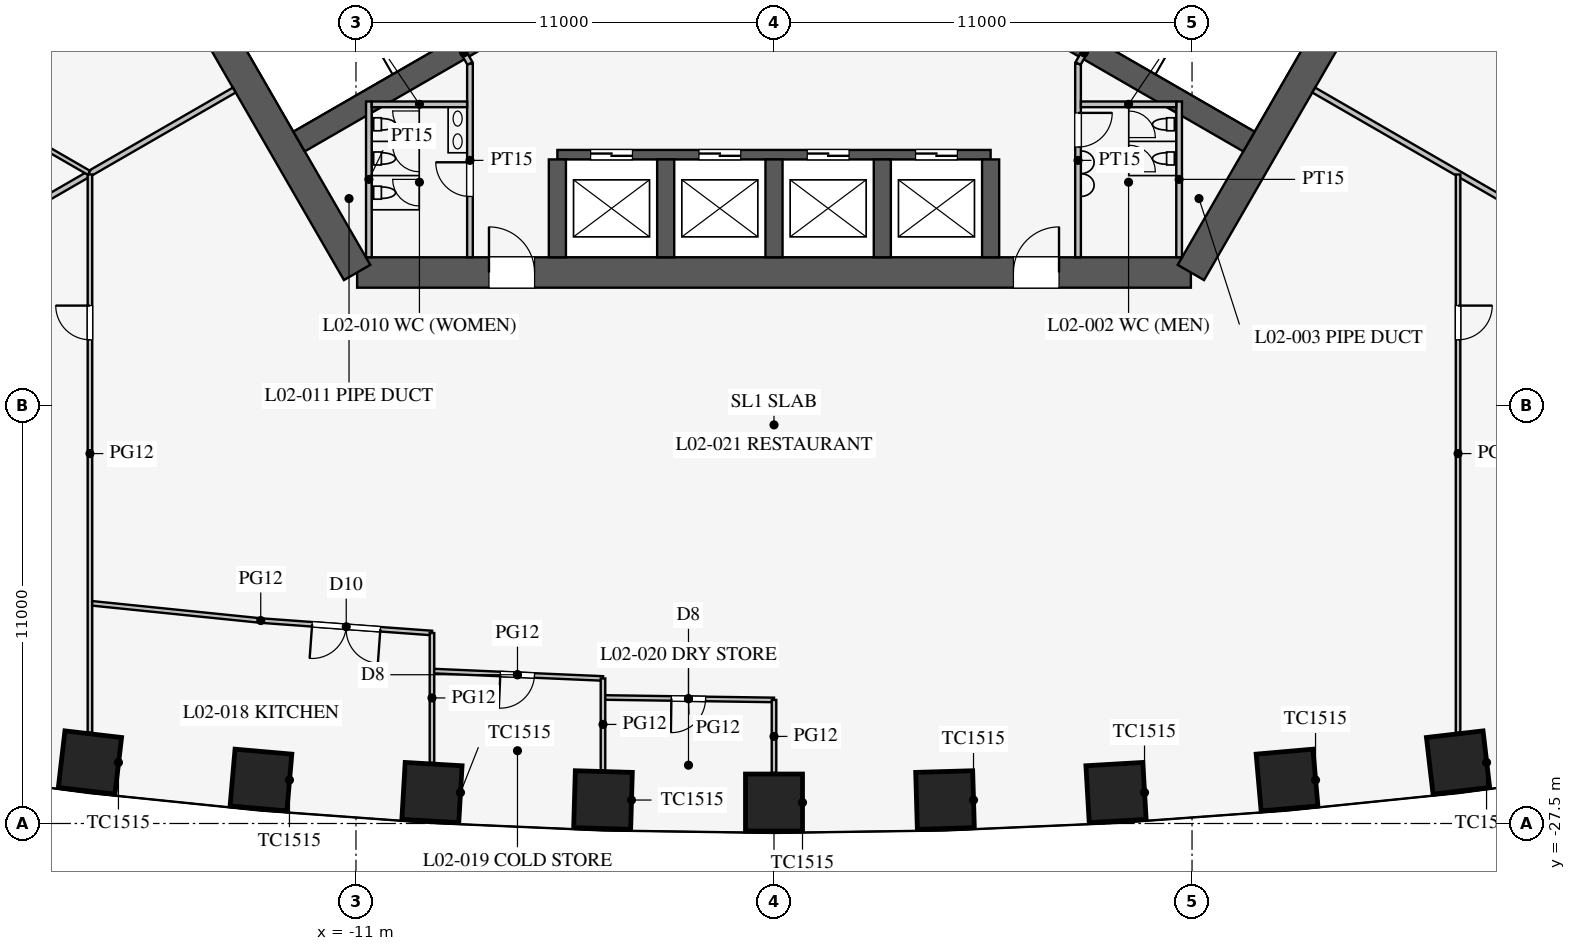
"""IFC4 building model, lengths in metres.
Left out: names, types, materials, properties, quantities, classifications, styles, units other than length and angle.
Written with IfcOpenShell. Run it as: python <this file> out.ifc"""

import sys

from ifc_helpers import new_model, si_unit, direction, frame, frame_2d, origin, origin_2d, place, context, subcontext, project, spatial, rectangle, extrude, element, fill, save


model = new_model("IFC4")
c1 = context("Model", 3, precision=1e-05, world=origin(), true_north=direction((0.0, 1.0)))
c2 = subcontext(c1, "Body", "Model", "MODEL_VIEW")
j1 = project(units=[si_unit("LENGTHUNIT", "METRE"), si_unit("PLANEANGLEUNIT", "RADIAN")], contexts=[c1])
p1 = place(None, origin())
s1 = spatial("IfcSite", under=j1, at=p1, CompositionType="ELEMENT")
p2 = place(p1, origin())
s2 = spatial("IfcBuilding", under=s1, at=p2, CompositionType="ELEMENT")
p3 = place(p2, frame((0.0, 0.0, 11.5)))
s3 = spatial("IfcBuildingStorey", under=s2, at=p3, CompositionType="ELEMENT", Elevation=11.5)
for number, where, z_axis, x_axis in (
    (1, (-18.0, -25.895, 0.0), (0.0, 0.0, 1.0), (0.993, -0.116, 0.0)),
    (2, (-13.5, -26.357, 0.0), (0.0, 0.0, 1.0), (0.996, -0.087, 0.0)),
    (3, (-9.0, -26.686, 0.0), (0.0, 0.0, 1.0), (0.998, -0.058, 0.0)),
    (4, (-4.5, -26.883, 0.0), (0.0, 0.0, 1.0), (1.0, -0.029, 0.0)),
    (5, (0.0, -26.949, 0.0), (0.0, 0.0, 1.0), (1.0, 0.0, 0.0)),
    (6, (4.5, -26.883, 0.0), (0.0, 0.0, 1.0), (1.0, 0.029, 0.0)),
    (7, (9.0, -26.686, 0.0), (0.0, 0.0, 1.0), (0.998, 0.058, 0.0)),
    (8, (13.5, -26.357, 0.0), (0.0, 0.0, 1.0), (0.996, 0.087, 0.0)),
    (9, (18.0, -25.895, 0.0), (0.0, 0.0, 1.0), (0.993, 0.116, 0.0)),
):
    element("IfcColumn", number, at=place(p3, frame(where, z_axis=z_axis, x_axis=x_axis)), inside=s3, PredefinedType="COLUMN", context=c2, shape_type="SweptSolid", body=[
        extrude(rectangle(XDim=1.5, YDim=1.5, at=origin_2d()), origin(), (0.0, 0.0, 1.0), 5.0),
    ])
p4 = place(p3, frame((-10.97, -13.0, 0.0), z_axis=(0.0, 0.0, 1.0), x_axis=(1.0, 0.0, 0.0)))
e10 = element("IfcWall", 10, at=p4, inside=s3, PredefinedType="SHEAR", context=c2, shape_type="SweptSolid", body=[
    extrude(rectangle(XDim=21.939, YDim=0.8, at=frame_2d((10.97, 0.0))), origin(), (0.0, 0.0, 1.0), 5.0),
])
p5 = place(p4, frame((17.27, 0.0, 0.0)))
e11 = element("IfcOpeningElement", 11, at=p5, cuts=e10, PredefinedType="OPENING", context=c2, shape_type="SweptSolid", body=[
    extrude(rectangle(XDim=1.2, YDim=2.1, at=frame_2d((0.6, 1.05))), frame((0.0, 0.41, 0.0), z_axis=(0.0, -1.0, 0.0), x_axis=(1.0, 0.0, 0.0)), (0.0, 0.0, 1.0), 0.82),
])
p6 = place(p4, frame((3.47, 0.0, 0.0)))
e12 = element("IfcOpeningElement", 12, at=p6, cuts=e10, PredefinedType="OPENING", context=c2, shape_type="SweptSolid", body=[
    extrude(rectangle(XDim=1.2, YDim=2.1, at=frame_2d((0.6, 1.05))), frame((0.0, 0.41, 0.0), z_axis=(0.0, -1.0, 0.0), x_axis=(1.0, 0.0, 0.0)), (0.0, 0.0, 1.0), 0.82),
])
for number, where, z_axis, x_axis in (
    (13, (10.97, -13.0, 0.0), (0.0, 0.0, 1.0), (0.5, 0.866, 0.0)),
    (14, (-16.743, -3.0, 0.0), (0.0, 0.0, 1.0), (0.5, -0.866, 0.0)),
):
    element("IfcWall", number, at=place(p3, frame(where, z_axis=z_axis, x_axis=x_axis)), inside=s3, PredefinedType="SHEAR", context=c2, shape_type="SweptSolid", body=[
        extrude(rectangle(XDim=11.547, YDim=0.8, at=frame_2d((5.773, 0.0))), origin(), (0.0, 0.0, 1.0), 5.0),
    ])
p7 = place(p3, frame((-5.7, -9.9, 0.0), z_axis=(0.0, 0.0, 1.0), x_axis=(1.0, 0.0, 0.0)))
e15 = element("IfcWall", 15, at=p7, inside=s3, PredefinedType="SHEAR", context=c2, shape_type="SweptSolid", body=[
    extrude(rectangle(XDim=11.4, YDim=0.25, at=frame_2d((5.7, 0.0))), origin(), (0.0, 0.0, 1.0), 5.0),
])
p8 = place(p7, frame((0.875, 0.0, 0.0)))
e16 = element("IfcOpeningElement", 16, at=p8, cuts=e15, PredefinedType="OPENING", context=c2, shape_type="SweptSolid", body=[
    extrude(rectangle(XDim=1.1, YDim=2.2, at=frame_2d((0.55, 1.1))), frame((0.0, 0.135, 0.0), z_axis=(0.0, -1.0, 0.0), x_axis=(1.0, 0.0, 0.0)), (0.0, 0.0, 1.0), 0.27),
])
p9 = place(p7, frame((3.725, 0.0, 0.0)))
e17 = element("IfcOpeningElement", 17, at=p9, cuts=e15, PredefinedType="OPENING", context=c2, shape_type="SweptSolid", body=[
    extrude(rectangle(XDim=1.1, YDim=2.2, at=frame_2d((0.55, 1.1))), frame((0.0, 0.135, 0.0), z_axis=(0.0, -1.0, 0.0), x_axis=(1.0, 0.0, 0.0)), (0.0, 0.0, 1.0), 0.27),
])
p10 = place(p7, frame((6.575, 0.0, 0.0)))
e18 = element("IfcOpeningElement", 18, at=p10, cuts=e15, PredefinedType="OPENING", context=c2, shape_type="SweptSolid", body=[
    extrude(rectangle(XDim=1.1, YDim=2.2, at=frame_2d((0.55, 1.1))), frame((0.0, 0.135, 0.0), z_axis=(0.0, -1.0, 0.0), x_axis=(1.0, 0.0, 0.0)), (0.0, 0.0, 1.0), 0.27),
])
p11 = place(p7, frame((9.425, 0.0, 0.0)))
e19 = element("IfcOpeningElement", 19, at=p11, cuts=e15, PredefinedType="OPENING", context=c2, shape_type="SweptSolid", body=[
    extrude(rectangle(XDim=1.1, YDim=2.2, at=frame_2d((0.55, 1.1))), frame((0.0, 0.135, 0.0), z_axis=(0.0, -1.0, 0.0), x_axis=(1.0, 0.0, 0.0)), (0.0, 0.0, 1.0), 0.27),
])
for number, where, z_axis, x_axis in (
    (20, (-5.7, -10.025, 0.0), (0.0, 0.0, 1.0), (0.0, -1.0, 0.0)),
    (21, (-2.85, -10.025, 0.0), (0.0, 0.0, 1.0), (0.0, -1.0, 0.0)),
    (22, (0.0, -10.025, 0.0), (0.0, 0.0, 1.0), (0.0, -1.0, 0.0)),
    (23, (2.85, -10.025, 0.0), (0.0, 0.0, 1.0), (0.0, -1.0, 0.0)),
    (24, (5.7, -10.025, 0.0), (0.0, 0.0, 1.0), (0.0, -1.0, 0.0)),
):
    element("IfcWall", number, at=place(p3, frame(where, z_axis=z_axis, x_axis=x_axis)), inside=s3, PredefinedType="SHEAR", context=c2, shape_type="SweptSolid", body=[
        extrude(rectangle(XDim=2.575, YDim=0.45, at=frame_2d((1.288, 0.0))), origin(), (0.0, 0.0, 1.0), 5.0),
    ])
for number, where, z_axis, x_axis in (
    (25, (4.638, -5.016, 0.0), (0.0, 0.0, 1.0), (0.866, -0.5, 0.0)),
    (26, (-4.638, -5.016, 0.0), (0.0, 0.0, 1.0), (-0.866, -0.5, 0.0)),
):
    element("IfcWall", number, at=place(p3, frame(where, z_axis=z_axis, x_axis=x_axis)), inside=s3, PredefinedType="SHEAR", context=c2, shape_type="SweptSolid", body=[
        extrude(rectangle(XDim=9.075, YDim=0.6, at=frame_2d((4.538, 0.0))), origin(), (0.0, 0.0, 1.0), 5.0),
    ])
p12 = place(p3, frame((8.0, -7.5, 0.0), z_axis=(0.0, 0.0, 1.0), x_axis=(0.0, -1.0, 0.0)))
e27 = element("IfcWall", 27, at=p12, inside=s3, PredefinedType="PARTITIONING", context=c2, shape_type="SweptSolid", body=[
    extrude(rectangle(XDim=5.1, YDim=0.15, at=frame_2d((2.55, 0.0))), origin(), (0.0, 0.0, 1.0), 4.8),
])
p13 = place(p12, frame((1.3, 0.0, 0.0)))
e28 = element("IfcOpeningElement", 28, at=p13, cuts=e27, PredefinedType="OPENING", context=c2, shape_type="SweptSolid", body=[
    extrude(rectangle(XDim=0.9, YDim=2.1, at=frame_2d((0.45, 1.05))), frame((0.0, 0.085, 0.0), z_axis=(0.0, -1.0, 0.0), x_axis=(1.0, 0.0, 0.0)), (0.0, 0.0, 1.0), 0.17),
])
p14 = place(p3, frame((-8.0, -7.5, 0.0), z_axis=(0.0, 0.0, 1.0), x_axis=(0.0, -1.0, 0.0)))
e29 = element("IfcWall", 29, at=p14, inside=s3, PredefinedType="PARTITIONING", context=c2, shape_type="SweptSolid", body=[
    extrude(rectangle(XDim=5.1, YDim=0.15, at=frame_2d((2.55, 0.0))), origin(), (0.0, 0.0, 1.0), 4.8),
])
p15 = place(p14, frame((2.6, 0.0, 0.0)))
e30 = element("IfcOpeningElement", 30, at=p15, cuts=e29, PredefinedType="OPENING", context=c2, shape_type="SweptSolid", body=[
    extrude(rectangle(XDim=0.9, YDim=2.1, at=frame_2d((0.45, 1.05))), frame((0.0, 0.085, 0.0), z_axis=(0.0, -1.0, 0.0), x_axis=(1.0, 0.0, 0.0)), (0.0, 0.0, 1.0), 0.17),
])
for number, where, z_axis, x_axis in (
    (31, (8.0, -7.5, 0.0), (0.0, 0.0, 1.0), (0.5, 0.866, 0.0)),
    (32, (-8.0, -7.5, 0.0), (0.0, 0.0, 1.0), (-0.5, 0.866, 0.0)),
):
    element("IfcWall", number, at=place(p3, frame(where, z_axis=z_axis, x_axis=x_axis)), inside=s3, PredefinedType="PARTITIONING", context=c2, shape_type="SweptSolid", body=[
        extrude(rectangle(XDim=0.645, YDim=0.15, at=frame_2d((0.323, 0.0))), origin(), (0.0, 0.0, 1.0), 4.8),
    ])
p16 = place(p3, frame((10.66, -8.5, 0.0), z_axis=(0.0, 0.0, 1.0), x_axis=(0.0, -1.0, 0.0)))
e33 = element("IfcWall", 33, at=p16, inside=s3, PredefinedType="PARTITIONING", context=c2, shape_type="SweptSolid", body=[
    extrude(rectangle(XDim=4.1, YDim=0.15, at=frame_2d((2.05, 0.0))), origin(), (0.0, 0.0, 1.0), 4.8),
])
p17 = place(p3, frame((8.075, -8.575, 0.0), z_axis=(0.0, 0.0, 1.0), x_axis=(1.0, 0.0, 0.0)))
e34 = element("IfcWall", 34, at=p17, inside=s3, PredefinedType="PARTITIONING", context=c2, shape_type="SweptSolid", body=[
    extrude(rectangle(XDim=2.51, YDim=0.15, at=frame_2d((1.255, 0.0))), origin(), (0.0, 0.0, 1.0), 4.8),
])
p18 = place(p3, frame((-10.66, -8.5, 0.0), z_axis=(0.0, 0.0, 1.0), x_axis=(0.0, -1.0, 0.0)))
e35 = element("IfcWall", 35, at=p18, inside=s3, PredefinedType="PARTITIONING", context=c2, shape_type="SweptSolid", body=[
    extrude(rectangle(XDim=4.1, YDim=0.15, at=frame_2d((2.05, 0.0))), origin(), (0.0, 0.0, 1.0), 4.8),
])
p19 = place(p3, frame((-8.075, -8.575, 0.0), z_axis=(0.0, 0.0, 1.0), x_axis=(-1.0, 0.0, 0.0)))
e36 = element("IfcWall", 36, at=p19, inside=s3, PredefinedType="PARTITIONING", context=c2, shape_type="SweptSolid", body=[
    extrude(rectangle(XDim=2.51, YDim=0.15, at=frame_2d((1.255, 0.0))), origin(), (0.0, 0.0, 1.0), 4.8),
])
for number, where, z_axis, x_axis in (
    (37, (14.203, -8.2, 0.0), (0.0, 0.0, 1.0), (0.866, -0.5, 0.0)),
    (38, (-14.203, -8.2, 0.0), (0.0, 0.0, 1.0), (-0.866, -0.5, 0.0)),
):
    element("IfcWall", number, at=place(p3, frame(where, z_axis=z_axis, x_axis=x_axis)), inside=s3, PredefinedType="PARTITIONING", context=c2, shape_type="SweptSolid", body=[
        extrude(rectangle(XDim=18.25, YDim=0.15, at=frame_2d((9.125, 0.0))), origin(), (0.0, 0.0, 1.0), 3.1),
    ])
p20 = place(p3, frame((-13.5, -22.16, 0.0), z_axis=(0.0, 0.0, 1.0), x_axis=(0.997363894896, -0.072562119306, 0.0)))
e39 = element("IfcWall", 39, at=p20, inside=s3, PredefinedType="PARTITIONING", context=c2, shape_type="SweptSolid", body=[
    extrude(rectangle(XDim=4.512, YDim=0.12, at=frame_2d((2.256, 0.0))), origin(), (0.0, 0.0, 1.0), 3.6),
])
p21 = place(p20, frame((1.35, 0.0, 0.0)))
e40 = element("IfcOpeningElement", 40, at=p21, cuts=e39, PredefinedType="OPENING", context=c2, shape_type="SweptSolid", body=[
    extrude(rectangle(XDim=1.8, YDim=2.1, at=frame_2d((0.9, 1.05))), frame((0.0, 0.07, 0.0), z_axis=(0.0, -1.0, 0.0), x_axis=(1.0, 0.0, 0.0)), (0.0, 0.0, 1.0), 0.14),
])
p22 = place(p3, frame((-18.0, -21.701, 0.0), z_axis=(0.0, 0.0, 1.0), x_axis=(0.994833141332, -0.101523499286, 0.0)))
e41 = element("IfcWall", 41, at=p22, inside=s3, PredefinedType="PARTITIONING", context=c2, shape_type="SweptSolid", body=[
    extrude(rectangle(XDim=4.523, YDim=0.12, at=frame_2d((2.262, 0.0))), origin(), (0.0, 0.0, 1.0), 3.6),
])
p23 = place(p3, frame((-4.5, -24.183, 0.0), z_axis=(0.0, 0.0, 1.0), x_axis=(0.999894311967, -0.014538393859, 0.0)))
e42 = element("IfcWall", 42, at=p23, inside=s3, PredefinedType="PARTITIONING", context=c2, shape_type="SweptSolid", body=[
    extrude(rectangle(XDim=4.5, YDim=0.12, at=frame_2d((2.25, 0.0))), origin(), (0.0, 0.0, 1.0), 3.6),
])
p24 = place(p23, frame((1.8, 0.0, 0.0)))
e43 = element("IfcOpeningElement", 43, at=p24, cuts=e42, PredefinedType="OPENING", context=c2, shape_type="SweptSolid", body=[
    extrude(rectangle(XDim=0.9, YDim=2.1, at=frame_2d((0.45, 1.05))), frame((0.0, 0.07, 0.0), z_axis=(0.0, -1.0, 0.0), x_axis=(1.0, 0.0, 0.0)), (0.0, 0.0, 1.0), 0.14),
])
p25 = place(p3, frame((-9.0, -23.487, 0.0), z_axis=(0.0, 0.0, 1.0), x_axis=(0.999052370647, -0.043524254212, 0.0)))
e44 = element("IfcWall", 44, at=p25, inside=s3, PredefinedType="PARTITIONING", context=c2, shape_type="SweptSolid", body=[
    extrude(rectangle(XDim=4.504, YDim=0.12, at=frame_2d((2.252, 0.0))), origin(), (0.0, 0.0, 1.0), 3.6),
])
p26 = place(p25, frame((1.8, 0.0, 0.0)))
e45 = element("IfcOpeningElement", 45, at=p26, cuts=e44, PredefinedType="OPENING", context=c2, shape_type="SweptSolid", body=[
    extrude(rectangle(XDim=0.9, YDim=2.1, at=frame_2d((0.45, 1.05))), frame((0.0, 0.07, 0.0), z_axis=(0.0, -1.0, 0.0), x_axis=(1.0, 0.0, 0.0)), (0.0, 0.0, 1.0), 0.14),
])
p27 = place(p3, frame((0.0, -24.249, 0.0), z_axis=(0.0, 0.0, 1.0), x_axis=(0.0, -1.0, 0.0)))
e46 = element("IfcWall", 46, at=p27, inside=s3, PredefinedType="PARTITIONING", context=c2, shape_type="SweptSolid", body=[
    extrude(rectangle(XDim=1.92, YDim=0.12, at=frame_2d((0.96, 0.0))), origin(), (0.0, 0.0, 1.0), 3.6),
])
p28 = place(p3, frame((18.0, -10.421, 0.0), z_axis=(0.0, 0.0, 1.0), x_axis=(0.0, -1.0, 0.0)))
e47 = element("IfcWall", 47, at=p28, inside=s3, PredefinedType="PARTITIONING", context=c2, shape_type="SweptSolid", body=[
    extrude(rectangle(XDim=14.688, YDim=0.12, at=frame_2d((7.344, 0.0))), origin(), (0.0, 0.0, 1.0), 3.6),
])
p29 = place(p28, frame((3.45, 0.0, 0.0)))
e48 = element("IfcOpeningElement", 48, at=p29, cuts=e47, PredefinedType="OPENING", context=c2, shape_type="SweptSolid", body=[
    extrude(rectangle(XDim=0.9, YDim=2.1, at=frame_2d((0.45, 1.05))), frame((0.0, 0.07, 0.0), z_axis=(0.0, -1.0, 0.0), x_axis=(1.0, 0.0, 0.0)), (0.0, 0.0, 1.0), 0.14),
])
p30 = place(p3, frame((-18.0, -10.421, 0.0), z_axis=(0.0, 0.0, 1.0), x_axis=(0.0, -1.0, 0.0)))
e49 = element("IfcWall", 49, at=p30, inside=s3, PredefinedType="PARTITIONING", context=c2, shape_type="SweptSolid", body=[
    extrude(rectangle(XDim=14.688, YDim=0.12, at=frame_2d((7.344, 0.0))), origin(), (0.0, 0.0, 1.0), 3.6),
])
p31 = place(p30, frame((3.45, 0.0, 0.0)))
e50 = element("IfcOpeningElement", 50, at=p31, cuts=e49, PredefinedType="OPENING", context=c2, shape_type="SweptSolid", body=[
    extrude(rectangle(XDim=0.9, YDim=2.1, at=frame_2d((0.45, 1.05))), frame((0.0, 0.07, 0.0), z_axis=(0.0, -1.0, 0.0), x_axis=(1.0, 0.0, 0.0)), (0.0, 0.0, 1.0), 0.14),
])
p32 = place(p3, frame((-4.5, -23.683, 0.0), z_axis=(0.0, 0.0, 1.0), x_axis=(0.0, -1.0, 0.0)))
e51 = element("IfcWall", 51, at=p32, inside=s3, PredefinedType="PARTITIONING", context=c2, shape_type="SweptSolid", body=[
    extrude(rectangle(XDim=2.419, YDim=0.12, at=frame_2d((1.21, 0.0))), origin(), (0.0, 0.0, 1.0), 3.6),
])
p33 = place(p3, frame((-9.0, -22.487, 0.0), z_axis=(0.0, 0.0, 1.0), x_axis=(0.0, -1.0, 0.0)))
e52 = element("IfcWall", 52, at=p33, inside=s3, PredefinedType="PARTITIONING", context=c2, shape_type="SweptSolid", body=[
    extrude(rectangle(XDim=3.417, YDim=0.12, at=frame_2d((1.709, 0.0))), origin(), (0.0, 0.0, 1.0), 3.6),
])
p34 = place(p3, frame((-18.025, -10.378, 0.0), z_axis=(0.0, 0.0, 1.0), x_axis=(-0.866027263711, 0.4999967785, 0.0)))
e53 = element("IfcWall", 53, at=p34, inside=s3, PredefinedType="PARTITIONING", context=c2, shape_type="SweptSolid", body=[
    extrude(rectangle(XDim=14.688, YDim=0.12, at=frame_2d((7.344, 0.0))), origin(), (0.0, 0.0, 1.0), 3.6),
])
p35 = place(p34, frame((3.45, 0.0, 0.0)))
e54 = element("IfcOpeningElement", 54, at=p35, cuts=e53, PredefinedType="OPENING", context=c2, shape_type="SweptSolid", body=[
    extrude(rectangle(XDim=0.9, YDim=2.1, at=frame_2d((0.45, 1.05))), frame((0.0, 0.07, 0.0), z_axis=(0.0, -1.0, 0.0), x_axis=(1.0, 0.0, 0.0)), (0.0, 0.0, 1.0), 0.14),
])
p36 = place(p13, origin())
e55 = element("IfcDoor", 55, at=p36, inside=s3, OperationType="SINGLE_SWING_LEFT", PredefinedType="DOOR", context=c2, shape_type="SweptSolid", body=[
    extrude(rectangle(XDim=0.9, YDim=2.1, at=frame_2d((0.45, 1.05))), frame((0.0, 0.025, 0.0), z_axis=(0.0, -1.0, 0.0), x_axis=(1.0, 0.0, 0.0)), (0.0, 0.0, 1.0), 0.05),
])
fill(e28, e55)
p37 = place(p15, frame((0.9, 0.0, 0.0), z_axis=(0.0, 0.0, 1.0), x_axis=(-1.0, 0.0, 0.0)))
e56 = element("IfcDoor", 56, at=p37, inside=s3, OperationType="SINGLE_SWING_RIGHT", PredefinedType="DOOR", context=c2, shape_type="SweptSolid", body=[
    extrude(rectangle(XDim=0.9, YDim=2.1, at=frame_2d((0.45, 1.05))), frame((0.0, 0.025, 0.0), z_axis=(0.0, -1.0, 0.0), x_axis=(1.0, 0.0, 0.0)), (0.0, 0.0, 1.0), 0.05),
])
fill(e30, e56)
p38 = place(p5, origin())
e57 = element("IfcDoor", 57, at=p38, inside=s3, OperationType="SINGLE_SWING_RIGHT", PredefinedType="DOOR", context=c2, shape_type="SweptSolid", body=[
    extrude(rectangle(XDim=1.2, YDim=2.1, at=frame_2d((0.6, 1.05))), frame((0.0, 0.025, 0.0), z_axis=(0.0, -1.0, 0.0), x_axis=(1.0, 0.0, 0.0)), (0.0, 0.0, 1.0), 0.05),
])
fill(e11, e57)
p39 = place(p6, origin())
e58 = element("IfcDoor", 58, at=p39, inside=s3, OperationType="SINGLE_SWING_LEFT", PredefinedType="DOOR", context=c2, shape_type="SweptSolid", body=[
    extrude(rectangle(XDim=1.2, YDim=2.1, at=frame_2d((0.6, 1.05))), frame((0.0, 0.025, 0.0), z_axis=(0.0, -1.0, 0.0), x_axis=(1.0, 0.0, 0.0)), (0.0, 0.0, 1.0), 0.05),
])
fill(e12, e58)
p40 = place(p29, origin())
e59 = element("IfcDoor", 59, at=p40, inside=s3, OperationType="SINGLE_SWING_LEFT", PredefinedType="DOOR", context=c2, shape_type="SweptSolid", body=[
    extrude(rectangle(XDim=0.9, YDim=2.1, at=frame_2d((0.45, 1.05))), frame((0.0, 0.025, 0.0), z_axis=(0.0, -1.0, 0.0), x_axis=(1.0, 0.0, 0.0)), (0.0, 0.0, 1.0), 0.05),
])
fill(e48, e59)
p41 = place(p31, frame((0.9, 0.0, 0.0), z_axis=(0.0, 0.0, 1.0), x_axis=(-1.0, 0.0, 0.0)))
e60 = element("IfcDoor", 60, at=p41, inside=s3, OperationType="SINGLE_SWING_RIGHT", PredefinedType="DOOR", context=c2, shape_type="SweptSolid", body=[
    extrude(rectangle(XDim=0.9, YDim=2.1, at=frame_2d((0.45, 1.05))), frame((0.0, 0.025, 0.0), z_axis=(0.0, -1.0, 0.0), x_axis=(1.0, 0.0, 0.0)), (0.0, 0.0, 1.0), 0.05),
])
fill(e50, e60)
p42 = place(p21, frame((1.8, 0.0, 0.0), z_axis=(0.0, 0.0, 1.0), x_axis=(-1.0, 0.0, 0.0)))
e61 = element("IfcDoor", 61, at=p42, inside=s3, OperationType="DOUBLE_DOOR_SINGLE_SWING", PredefinedType="DOOR", context=c2, shape_type="SweptSolid", body=[
    extrude(rectangle(XDim=1.8, YDim=2.1, at=frame_2d((0.9, 1.05))), frame((0.0, 0.025, 0.0), z_axis=(0.0, -1.0, 0.0), x_axis=(1.0, 0.0, 0.0)), (0.0, 0.0, 1.0), 0.05),
])
fill(e40, e61)
p43 = place(p26, frame((0.9, 0.0, 0.0), z_axis=(0.0, 0.0, 1.0), x_axis=(-1.0, 0.0, 0.0)))
e62 = element("IfcDoor", 62, at=p43, inside=s3, OperationType="SINGLE_SWING_RIGHT", PredefinedType="DOOR", context=c2, shape_type="SweptSolid", body=[
    extrude(rectangle(XDim=0.9, YDim=2.1, at=frame_2d((0.45, 1.05))), frame((0.0, 0.025, 0.0), z_axis=(0.0, -1.0, 0.0), x_axis=(1.0, 0.0, 0.0)), (0.0, 0.0, 1.0), 0.05),
])
fill(e45, e62)
p44 = place(p24, frame((0.9, 0.0, 0.0), z_axis=(0.0, 0.0, 1.0), x_axis=(-1.0, 0.0, 0.0)))
e63 = element("IfcDoor", 63, at=p44, inside=s3, OperationType="SINGLE_SWING_RIGHT", PredefinedType="DOOR", context=c2, shape_type="SweptSolid", body=[
    extrude(rectangle(XDim=0.9, YDim=2.1, at=frame_2d((0.45, 1.05))), frame((0.0, 0.025, 0.0), z_axis=(0.0, -1.0, 0.0), x_axis=(1.0, 0.0, 0.0)), (0.0, 0.0, 1.0), 0.05),
])
fill(e43, e63)
p45 = place(p8, origin())
e64 = element("IfcDoor", 64, at=p45, inside=s3, OperationType="DOUBLE_DOOR_SLIDING", PredefinedType="DOOR", context=c2, shape_type="SweptSolid", body=[
    extrude(rectangle(XDim=1.1, YDim=2.2, at=frame_2d((0.55, 1.1))), frame((0.0, 0.025, 0.0), z_axis=(0.0, -1.0, 0.0), x_axis=(1.0, 0.0, 0.0)), (0.0, 0.0, 1.0), 0.05),
])
fill(e16, e64)
p46 = place(p9, origin())
e65 = element("IfcDoor", 65, at=p46, inside=s3, OperationType="DOUBLE_DOOR_SLIDING", PredefinedType="DOOR", context=c2, shape_type="SweptSolid", body=[
    extrude(rectangle(XDim=1.1, YDim=2.2, at=frame_2d((0.55, 1.1))), frame((0.0, 0.025, 0.0), z_axis=(0.0, -1.0, 0.0), x_axis=(1.0, 0.0, 0.0)), (0.0, 0.0, 1.0), 0.05),
])
fill(e17, e65)
p47 = place(p10, origin())
e66 = element("IfcDoor", 66, at=p47, inside=s3, OperationType="DOUBLE_DOOR_SLIDING", PredefinedType="DOOR", context=c2, shape_type="SweptSolid", body=[
    extrude(rectangle(XDim=1.1, YDim=2.2, at=frame_2d((0.55, 1.1))), frame((0.0, 0.025, 0.0), z_axis=(0.0, -1.0, 0.0), x_axis=(1.0, 0.0, 0.0)), (0.0, 0.0, 1.0), 0.05),
])
fill(e18, e66)
p48 = place(p11, origin())
e67 = element("IfcDoor", 67, at=p48, inside=s3, OperationType="DOUBLE_DOOR_SLIDING", PredefinedType="DOOR", context=c2, shape_type="SweptSolid", body=[
    extrude(rectangle(XDim=1.1, YDim=2.2, at=frame_2d((0.55, 1.1))), frame((0.0, 0.025, 0.0), z_axis=(0.0, -1.0, 0.0), x_axis=(1.0, 0.0, 0.0)), (0.0, 0.0, 1.0), 0.05),
])
fill(e19, e67)
save(model, sys.argv[1])
